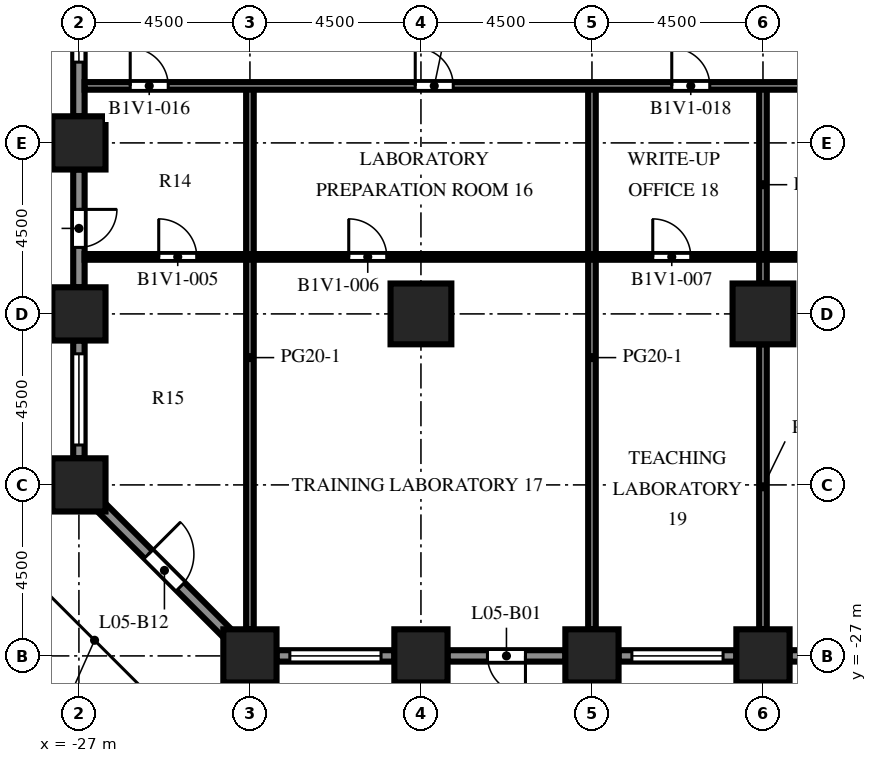
"""IFC4 building model, lengths in metres.
Left out: names, types, materials, properties, quantities, classifications, styles, units other than length and angle.
Written with IfcOpenShell. Run it as: python <this file> out.ifc"""

import sys

from ifc_helpers import new_model, si_unit, direction, frame, frame_2d, origin, origin_2d, place, context, subcontext, project, spatial, rectangle, extrude, element, fill, save


model = new_model("IFC4")
c1 = context("Model", 3, precision=1e-05, world=origin(), true_north=direction((0.0, 1.0)))
c2 = subcontext(c1, "Body", "Model", "MODEL_VIEW")
j1 = project(units=[si_unit("LENGTHUNIT", "METRE"), si_unit("PLANEANGLEUNIT", "RADIAN")], contexts=[c1])
p1 = place(None, origin())
s1 = spatial("IfcSite", under=j1, at=p1, CompositionType="ELEMENT")
p2 = place(p1, origin())
s2 = spatial("IfcBuilding", under=s1, at=p2, CompositionType="ELEMENT")
p3 = place(p2, frame((0.0, 0.0, 23.6)))
s3 = spatial("IfcBuildingStorey", under=s2, at=p3, CompositionType="ELEMENT", Elevation=23.6)
for number, where, z_axis, x_axis in (
    (1, (-27.0, -22.5, 0.0), (0.0, 0.0, 1.0), (1.0, 0.0, 0.0)),
    (2, (-27.0, -18.0, 0.0), (0.0, 0.0, 1.0), (1.0, 0.0, 0.0)),
    (3, (-27.0, -13.5, 0.0), (0.0, 0.0, 1.0), (1.0, 0.0, 0.0)),
    (4, (-22.5, -27.0, 0.0), (0.0, 0.0, 1.0), (1.0, 0.0, 0.0)),
    (5, (-18.0, -27.0, 0.0), (0.0, 0.0, 1.0), (1.0, 0.0, 0.0)),
    (6, (-13.5, -27.0, 0.0), (0.0, 0.0, 1.0), (1.0, 0.0, 0.0)),
    (7, (-9.0, -27.0, 0.0), (0.0, 0.0, 1.0), (1.0, 0.0, 0.0)),
):
    element("IfcColumn", number, at=place(p3, frame(where, z_axis=z_axis, x_axis=x_axis)), inside=s3, PredefinedType="COLUMN", context=c2, shape_type="SweptSolid", body=[
        extrude(rectangle(XDim=1.4, YDim=1.4, at=origin_2d()), origin(), (0.0, 0.0, 1.0), 4.1),
    ])
for number, where, z_axis, x_axis in (
    (8, (-18.0, -18.0, 0.0), (0.0, 0.0, 1.0), (1.0, 0.0, 0.0)),
    (9, (-9.0, -18.0, 0.0), (0.0, 0.0, 1.0), (1.0, 0.0, 0.0)),
):
    element("IfcColumn", number, at=place(p3, frame(where, z_axis=z_axis, x_axis=x_axis)), inside=s3, PredefinedType="COLUMN", context=c2, shape_type="SweptSolid", body=[
        extrude(rectangle(XDim=1.6, YDim=1.6, at=origin_2d()), origin(), (0.0, 0.0, 1.0), 4.1),
    ])
p4 = place(p3, frame((-18.7, -27.0, 0.0), z_axis=(0.0, 0.0, 1.0), x_axis=(-1.0, 0.0, 0.0)))
e10 = element("IfcWall", 10, at=p4, inside=s3, PredefinedType="SOLIDWALL", context=c2, shape_type="SweptSolid", body=[
    extrude(rectangle(XDim=3.1, YDim=0.3, at=frame_2d((1.55, 0.0))), origin(), (0.0, 0.0, 1.0), 2.75),
])
p5 = place(p4, frame((0.35, 0.0, 0.8)))
e11 = element("IfcOpeningElement", 11, at=p5, cuts=e10, PredefinedType="OPENING", context=c2, shape_type="SweptSolid", body=[
    extrude(rectangle(XDim=2.4, YDim=1.7, at=frame_2d((1.2, 0.85))), frame((0.0, 0.16, 0.0), z_axis=(0.0, -1.0, 0.0), x_axis=(1.0, 0.0, 0.0)), (0.0, 0.0, 1.0), 0.32),
])
p6 = place(p3, frame((-14.2, -27.0, 0.0), z_axis=(0.0, 0.0, 1.0), x_axis=(-1.0, 0.0, 0.0)))
e12 = element("IfcWall", 12, at=p6, inside=s3, PredefinedType="SOLIDWALL", context=c2, shape_type="SweptSolid", body=[
    extrude(rectangle(XDim=3.1, YDim=0.3, at=frame_2d((1.55, 0.0))), origin(), (0.0, 0.0, 1.0), 2.75),
])
p7 = place(p6, frame((1.05, 0.0, 0.0)))
e13 = element("IfcOpeningElement", 13, at=p7, cuts=e12, PredefinedType="OPENING", context=c2, shape_type="SweptSolid", body=[
    extrude(rectangle(XDim=1.0, YDim=2.2, at=frame_2d((0.5, 1.1))), frame((0.0, 0.16, 0.0), z_axis=(0.0, -1.0, 0.0), x_axis=(1.0, 0.0, 0.0)), (0.0, 0.0, 1.0), 0.32),
])
p8 = place(p3, frame((-9.7, -27.0, 0.0), z_axis=(0.0, 0.0, 1.0), x_axis=(-1.0, 0.0, 0.0)))
e14 = element("IfcWall", 14, at=p8, inside=s3, PredefinedType="SOLIDWALL", context=c2, shape_type="SweptSolid", body=[
    extrude(rectangle(XDim=3.1, YDim=0.3, at=frame_2d((1.55, 0.0))), origin(), (0.0, 0.0, 1.0), 2.75),
])
p9 = place(p8, frame((0.35, 0.0, 0.8)))
e15 = element("IfcOpeningElement", 15, at=p9, cuts=e14, PredefinedType="OPENING", context=c2, shape_type="SweptSolid", body=[
    extrude(rectangle(XDim=2.4, YDim=1.7, at=frame_2d((1.2, 0.85))), frame((0.0, 0.16, 0.0), z_axis=(0.0, -1.0, 0.0), x_axis=(1.0, 0.0, 0.0)), (0.0, 0.0, 1.0), 0.32),
])
p10 = place(p3, frame((-5.2, -27.0, 0.0), z_axis=(0.0, 0.0, 1.0), x_axis=(-1.0, 0.0, 0.0)))
e16 = element("IfcWall", 16, at=p10, inside=s3, PredefinedType="SOLIDWALL", context=c2, shape_type="SweptSolid", body=[
    extrude(rectangle(XDim=3.1, YDim=0.3, at=frame_2d((1.55, 0.0))), origin(), (0.0, 0.0, 1.0), 2.75),
])
p11 = place(p10, frame((0.35, 0.0, 0.8)))
e17 = element("IfcOpeningElement", 17, at=p11, cuts=e16, PredefinedType="OPENING", context=c2, shape_type="SweptSolid", body=[
    extrude(rectangle(XDim=2.4, YDim=1.7, at=frame_2d((1.2, 0.85))), frame((0.0, 0.16, 0.0), z_axis=(0.0, -1.0, 0.0), x_axis=(1.0, 0.0, 0.0)), (0.0, 0.0, 1.0), 0.32),
])
p12 = place(p3, frame((-27.0, -12.8, 0.0), z_axis=(0.0, 0.0, 1.0), x_axis=(0.0, 1.0, 0.0)))
e18 = element("IfcWall", 18, at=p12, inside=s3, PredefinedType="SOLIDWALL", context=c2, shape_type="SweptSolid", body=[
    extrude(rectangle(XDim=3.1, YDim=0.3, at=frame_2d((1.55, 0.0))), origin(), (0.0, 0.0, 1.0), 2.75),
])
p13 = place(p12, frame((1.425, 0.0, 0.8)))
e19 = element("IfcOpeningElement", 19, at=p13, cuts=e18, PredefinedType="OPENING", context=c2, shape_type="SweptSolid", body=[
    extrude(rectangle(XDim=1.2, YDim=1.7, at=frame_2d((0.6, 0.85))), frame((0.0, 0.16, 0.0), z_axis=(0.0, -1.0, 0.0), x_axis=(1.0, 0.0, 0.0)), (0.0, 0.0, 1.0), 0.32),
])
p14 = place(p3, frame((-27.0, -17.3, 0.0), z_axis=(0.0, 0.0, 1.0), x_axis=(0.0, 1.0, 0.0)))
e20 = element("IfcWall", 20, at=p14, inside=s3, PredefinedType="SOLIDWALL", context=c2, shape_type="SweptSolid", body=[
    extrude(rectangle(XDim=3.1, YDim=0.3, at=frame_2d((1.55, 0.0))), origin(), (0.0, 0.0, 1.0), 2.75),
])
p15 = place(p14, frame((1.05, 0.0, 0.0)))
e21 = element("IfcOpeningElement", 21, at=p15, cuts=e20, PredefinedType="OPENING", context=c2, shape_type="SweptSolid", body=[
    extrude(rectangle(XDim=1.0, YDim=2.2, at=frame_2d((0.5, 1.1))), frame((0.0, 0.16, 0.0), z_axis=(0.0, -1.0, 0.0), x_axis=(1.0, 0.0, 0.0)), (0.0, 0.0, 1.0), 0.32),
])
p16 = place(p3, frame((-27.0, -21.8, 0.0), z_axis=(0.0, 0.0, 1.0), x_axis=(0.0, 1.0, 0.0)))
e22 = element("IfcWall", 22, at=p16, inside=s3, PredefinedType="SOLIDWALL", context=c2, shape_type="SweptSolid", body=[
    extrude(rectangle(XDim=3.1, YDim=0.3, at=frame_2d((1.55, 0.0))), origin(), (0.0, 0.0, 1.0), 2.75),
])
p17 = place(p16, frame((0.35, 0.0, 0.8)))
e23 = element("IfcOpeningElement", 23, at=p17, cuts=e22, PredefinedType="OPENING", context=c2, shape_type="SweptSolid", body=[
    extrude(rectangle(XDim=2.4, YDim=1.7, at=frame_2d((1.2, 0.85))), frame((0.0, 0.16, 0.0), z_axis=(0.0, -1.0, 0.0), x_axis=(1.0, 0.0, 0.0)), (0.0, 0.0, 1.0), 0.32),
])
p18 = place(p3, frame((-23.094, -26.406, 0.0), z_axis=(0.0, 0.0, 1.0), x_axis=(-0.707106781187, 0.707106781187, 0.0)))
e24 = element("IfcWall", 24, at=p18, inside=s3, PredefinedType="SOLIDWALL", context=c2, shape_type="SweptSolid", body=[
    extrude(rectangle(XDim=4.684, YDim=0.3, at=frame_2d((2.342, 0.0))), origin(), (0.0, 0.0, 1.0), 2.75),
])
p19 = place(p18, frame((1.742, 0.0, 0.0)))
e25 = element("IfcOpeningElement", 25, at=p19, cuts=e24, PredefinedType="OPENING", context=c2, shape_type="SweptSolid", body=[
    extrude(rectangle(XDim=1.2, YDim=2.2, at=frame_2d((0.6, 1.1))), frame((0.0, 0.16, 0.0), z_axis=(0.0, -1.0, 0.0), x_axis=(1.0, 0.0, 0.0)), (0.0, 0.0, 1.0), 0.32),
])
for number, where, z_axis, x_axis in (
    (26, (-22.5, -26.3, 0.0), (0.0, 0.0, 1.0), (0.0, 1.0, 0.0)),
    (27, (-13.5, -26.3, 0.0), (0.0, 0.0, 1.0), (0.0, 1.0, 0.0)),
):
    element("IfcWall", number, at=place(p3, frame(where, z_axis=z_axis, x_axis=x_axis)), inside=s3, PredefinedType="PARTITIONING", context=c2, shape_type="SweptSolid", body=[
        extrude(rectangle(XDim=14.3, YDim=0.2, at=frame_2d((7.15, 0.0))), origin(), (0.0, 0.0, 1.0), 3.65),
    ])
p20 = place(p3, frame((-9.0, -26.3, 0.0), z_axis=(0.0, 0.0, 1.0), x_axis=(0.0, 1.0, 0.0)))
e28 = element("IfcWall", 28, at=p20, inside=s3, PredefinedType="PARTITIONING", context=c2, shape_type="SweptSolid", body=[
    extrude(rectangle(XDim=7.5, YDim=0.2, at=frame_2d((3.75, 0.0))), origin(), (0.0, 0.0, 1.0), 3.65),
])
p21 = place(p3, frame((-9.0, -17.2, 0.0), z_axis=(0.0, 0.0, 1.0), x_axis=(0.0, 1.0, 0.0)))
e29 = element("IfcWall", 29, at=p21, inside=s3, PredefinedType="PARTITIONING", context=c2, shape_type="SweptSolid", body=[
    extrude(rectangle(XDim=5.2, YDim=0.2, at=frame_2d((2.6, 0.0))), origin(), (0.0, 0.0, 1.0), 3.65),
])
p22 = place(p3, frame((26.85, -16.5, 0.0), z_axis=(0.0, 0.0, 1.0), x_axis=(-1.0, 0.0, 0.0)))
e30 = element("IfcWall", 30, at=p22, inside=s3, PredefinedType="PARTITIONING", context=c2, shape_type="SweptSolid", body=[
    extrude(rectangle(XDim=53.7, YDim=0.15, at=frame_2d((26.85, 0.0))), origin(), (0.0, 0.0, 1.0), 3.65),
])
p23 = place(p22, frame((50.75, 0.0, 0.0)))
e31 = element("IfcOpeningElement", 31, at=p23, cuts=e30, PredefinedType="OPENING", context=c2, shape_type="SweptSolid", body=[
    extrude(rectangle(XDim=1.0, YDim=2.1, at=frame_2d((0.5, 1.05))), frame((0.0, 0.085, 0.0), z_axis=(0.0, -1.0, 0.0), x_axis=(1.0, 0.0, 0.0)), (0.0, 0.0, 1.0), 0.17),
])
p24 = place(p22, frame((45.75, 0.0, 0.0)))
e32 = element("IfcOpeningElement", 32, at=p24, cuts=e30, PredefinedType="OPENING", context=c2, shape_type="SweptSolid", body=[
    extrude(rectangle(XDim=1.0, YDim=2.1, at=frame_2d((0.5, 1.05))), frame((0.0, 0.085, 0.0), z_axis=(0.0, -1.0, 0.0), x_axis=(1.0, 0.0, 0.0)), (0.0, 0.0, 1.0), 0.17),
])
p25 = place(p22, frame((37.75, 0.0, 0.0)))
e33 = element("IfcOpeningElement", 33, at=p25, cuts=e30, PredefinedType="OPENING", context=c2, shape_type="SweptSolid", body=[
    extrude(rectangle(XDim=1.0, YDim=2.1, at=frame_2d((0.5, 1.05))), frame((0.0, 0.085, 0.0), z_axis=(0.0, -1.0, 0.0), x_axis=(1.0, 0.0, 0.0)), (0.0, 0.0, 1.0), 0.17),
])
p26 = place(p22, frame((28.25, 0.0, 0.0)))
e34 = element("IfcOpeningElement", 34, at=p26, cuts=e30, PredefinedType="OPENING", context=c2, shape_type="SweptSolid", body=[
    extrude(rectangle(XDim=1.0, YDim=2.1, at=frame_2d((0.5, 1.05))), frame((0.0, 0.085, 0.0), z_axis=(0.0, -1.0, 0.0), x_axis=(1.0, 0.0, 0.0)), (0.0, 0.0, 1.0), 0.17),
])
p27 = place(p22, frame((19.75, 0.0, 0.0)))
e35 = element("IfcOpeningElement", 35, at=p27, cuts=e30, PredefinedType="OPENING", context=c2, shape_type="SweptSolid", body=[
    extrude(rectangle(XDim=1.0, YDim=2.1, at=frame_2d((0.5, 1.05))), frame((0.0, 0.085, 0.0), z_axis=(0.0, -1.0, 0.0), x_axis=(1.0, 0.0, 0.0)), (0.0, 0.0, 1.0), 0.17),
])
p28 = place(p22, frame((13.5, 0.0, 0.0)))
e36 = element("IfcOpeningElement", 36, at=p28, cuts=e30, PredefinedType="OPENING", context=c2, shape_type="SweptSolid", body=[
    extrude(rectangle(XDim=1.0, YDim=2.1, at=frame_2d((0.5, 1.05))), frame((0.0, 0.085, 0.0), z_axis=(0.0, -1.0, 0.0), x_axis=(1.0, 0.0, 0.0)), (0.0, 0.0, 1.0), 0.17),
])
p29 = place(p22, frame((6.75, 0.0, 0.0)))
e37 = element("IfcOpeningElement", 37, at=p29, cuts=e30, PredefinedType="OPENING", context=c2, shape_type="SweptSolid", body=[
    extrude(rectangle(XDim=1.0, YDim=2.1, at=frame_2d((0.5, 1.05))), frame((0.0, 0.085, 0.0), z_axis=(0.0, -1.0, 0.0), x_axis=(1.0, 0.0, 0.0)), (0.0, 0.0, 1.0), 0.17),
])
p30 = place(p22, frame((1.25, 0.0, 0.0)))
e38 = element("IfcOpeningElement", 38, at=p30, cuts=e30, PredefinedType="OPENING", context=c2, shape_type="SweptSolid", body=[
    extrude(rectangle(XDim=1.0, YDim=2.1, at=frame_2d((0.5, 1.05))), frame((0.0, 0.085, 0.0), z_axis=(0.0, -1.0, 0.0), x_axis=(1.0, 0.0, 0.0)), (0.0, 0.0, 1.0), 0.17),
])
p31 = place(p3, frame((26.85, -12.0, 0.0), z_axis=(0.0, 0.0, 1.0), x_axis=(-1.0, 0.0, 0.0)))
e39 = element("IfcWall", 39, at=p31, inside=s3, PredefinedType="PARTITIONING", context=c2, shape_type="SweptSolid", body=[
    extrude(rectangle(XDim=53.7, YDim=0.2, at=frame_2d((26.85, 0.0))), origin(), (0.0, 0.0, 1.0), 3.65),
])
p32 = place(p31, frame((51.5, 0.0, 0.0)))
e40 = element("IfcOpeningElement", 40, at=p32, cuts=e39, PredefinedType="OPENING", context=c2, shape_type="SweptSolid", body=[
    extrude(rectangle(XDim=1.0, YDim=2.1, at=frame_2d((0.5, 1.05))), frame((0.0, 0.11, 0.0), z_axis=(0.0, -1.0, 0.0), x_axis=(1.0, 0.0, 0.0)), (0.0, 0.0, 1.0), 0.22),
])
p33 = place(p31, frame((44.0, 0.0, 0.0)))
e41 = element("IfcOpeningElement", 41, at=p33, cuts=e39, PredefinedType="OPENING", context=c2, shape_type="SweptSolid", body=[
    extrude(rectangle(XDim=1.0, YDim=2.1, at=frame_2d((0.5, 1.05))), frame((0.0, 0.11, 0.0), z_axis=(0.0, -1.0, 0.0), x_axis=(1.0, 0.0, 0.0)), (0.0, 0.0, 1.0), 0.22),
])
p34 = place(p31, frame((37.25, 0.0, 0.0)))
e42 = element("IfcOpeningElement", 42, at=p34, cuts=e39, PredefinedType="OPENING", context=c2, shape_type="SweptSolid", body=[
    extrude(rectangle(XDim=1.0, YDim=2.1, at=frame_2d((0.5, 1.05))), frame((0.0, 0.11, 0.0), z_axis=(0.0, -1.0, 0.0), x_axis=(1.0, 0.0, 0.0)), (0.0, 0.0, 1.0), 0.22),
])
p35 = place(p31, frame((30.5, 0.0, 0.0)))
e43 = element("IfcOpeningElement", 43, at=p35, cuts=e39, PredefinedType="OPENING", context=c2, shape_type="SweptSolid", body=[
    extrude(rectangle(XDim=1.0, YDim=2.1, at=frame_2d((0.5, 1.05))), frame((0.0, 0.11, 0.0), z_axis=(0.0, -1.0, 0.0), x_axis=(1.0, 0.0, 0.0)), (0.0, 0.0, 1.0), 0.22),
])
p36 = place(p31, frame((20.0, 0.0, 0.0)))
e44 = element("IfcOpeningElement", 44, at=p36, cuts=e39, PredefinedType="OPENING", context=c2, shape_type="SweptSolid", body=[
    extrude(rectangle(XDim=1.0, YDim=2.1, at=frame_2d((0.5, 1.05))), frame((0.0, 0.11, 0.0), z_axis=(0.0, -1.0, 0.0), x_axis=(1.0, 0.0, 0.0)), (0.0, 0.0, 1.0), 0.22),
])
p37 = place(p31, frame((13.0, 0.0, 0.0)))
e45 = element("IfcOpeningElement", 45, at=p37, cuts=e39, PredefinedType="OPENING", context=c2, shape_type="SweptSolid", body=[
    extrude(rectangle(XDim=1.0, YDim=2.1, at=frame_2d((0.5, 1.05))), frame((0.0, 0.11, 0.0), z_axis=(0.0, -1.0, 0.0), x_axis=(1.0, 0.0, 0.0)), (0.0, 0.0, 1.0), 0.22),
])
p38 = place(p31, frame((5.75, 0.0, 0.0)))
e46 = element("IfcOpeningElement", 46, at=p38, cuts=e39, PredefinedType="OPENING", context=c2, shape_type="SweptSolid", body=[
    extrude(rectangle(XDim=1.0, YDim=2.1, at=frame_2d((0.5, 1.05))), frame((0.0, 0.11, 0.0), z_axis=(0.0, -1.0, 0.0), x_axis=(1.0, 0.0, 0.0)), (0.0, 0.0, 1.0), 0.22),
])
p39 = place(p31, frame((1.25, 0.0, 0.0)))
e47 = element("IfcOpeningElement", 47, at=p39, cuts=e39, PredefinedType="OPENING", context=c2, shape_type="SweptSolid", body=[
    extrude(rectangle(XDim=1.0, YDim=2.1, at=frame_2d((0.5, 1.05))), frame((0.0, 0.11, 0.0), z_axis=(0.0, -1.0, 0.0), x_axis=(1.0, 0.0, 0.0)), (0.0, 0.0, 1.0), 0.22),
])
p40 = place(p5, origin())
e48 = element("IfcWindow", 48, at=p40, inside=s3, PartitioningType="SINGLE_PANEL", PredefinedType="WINDOW", context=c2, shape_type="SweptSolid", body=[
    extrude(rectangle(XDim=2.4, YDim=1.7, at=frame_2d((1.2, 0.85))), frame((0.0, 0.03, 0.0), z_axis=(0.0, -1.0, 0.0), x_axis=(1.0, 0.0, 0.0)), (0.0, 0.0, 1.0), 0.06),
])
fill(e11, e48)
p41 = place(p7, origin())
e49 = element("IfcDoor", 49, at=p41, inside=s3, OperationType="SINGLE_SWING_LEFT", PredefinedType="DOOR", context=c2, shape_type="SweptSolid", body=[
    extrude(rectangle(XDim=1.0, YDim=2.2, at=frame_2d((0.5, 1.1))), frame((0.0, 0.025, 0.0), z_axis=(0.0, -1.0, 0.0), x_axis=(1.0, 0.0, 0.0)), (0.0, 0.0, 1.0), 0.05),
])
fill(e13, e49)
p42 = place(p9, origin())
e50 = element("IfcWindow", 50, at=p42, inside=s3, PartitioningType="SINGLE_PANEL", PredefinedType="WINDOW", context=c2, shape_type="SweptSolid", body=[
    extrude(rectangle(XDim=2.4, YDim=1.7, at=frame_2d((1.2, 0.85))), frame((0.0, 0.03, 0.0), z_axis=(0.0, -1.0, 0.0), x_axis=(1.0, 0.0, 0.0)), (0.0, 0.0, 1.0), 0.06),
])
fill(e15, e50)
p43 = place(p13, origin())
e51 = element("IfcWindow", 51, at=p43, inside=s3, PartitioningType="SINGLE_PANEL", PredefinedType="WINDOW", context=c2, shape_type="SweptSolid", body=[
    extrude(rectangle(XDim=1.2, YDim=1.7, at=frame_2d((0.6, 0.85))), frame((0.0, 0.03, 0.0), z_axis=(0.0, -1.0, 0.0), x_axis=(1.0, 0.0, 0.0)), (0.0, 0.0, 1.0), 0.06),
])
fill(e19, e51)
p44 = place(p15, origin())
e52 = element("IfcDoor", 52, at=p44, inside=s3, OperationType="SINGLE_SWING_RIGHT", PredefinedType="DOOR", context=c2, shape_type="SweptSolid", body=[
    extrude(rectangle(XDim=1.0, YDim=2.2, at=frame_2d((0.5, 1.1))), frame((0.0, 0.025, 0.0), z_axis=(0.0, -1.0, 0.0), x_axis=(1.0, 0.0, 0.0)), (0.0, 0.0, 1.0), 0.05),
])
fill(e21, e52)
p45 = place(p17, origin())
e53 = element("IfcWindow", 53, at=p45, inside=s3, PartitioningType="SINGLE_PANEL", PredefinedType="WINDOW", context=c2, shape_type="SweptSolid", body=[
    extrude(rectangle(XDim=2.4, YDim=1.7, at=frame_2d((1.2, 0.85))), frame((0.0, 0.03, 0.0), z_axis=(0.0, -1.0, 0.0), x_axis=(1.0, 0.0, 0.0)), (0.0, 0.0, 1.0), 0.06),
])
fill(e23, e53)
p46 = place(p19, origin())
e54 = element("IfcDoor", 54, at=p46, inside=s3, OperationType="SINGLE_SWING_RIGHT", PredefinedType="DOOR", context=c2, shape_type="SweptSolid", body=[
    extrude(rectangle(XDim=1.2, YDim=2.2, at=frame_2d((0.6, 1.1))), frame((0.0, 0.025, 0.0), z_axis=(0.0, -1.0, 0.0), x_axis=(1.0, 0.0, 0.0)), (0.0, 0.0, 1.0), 0.05),
])
fill(e25, e54)
p47 = place(p23, origin())
e55 = element("IfcDoor", 55, at=p47, inside=s3, OperationType="SINGLE_SWING_RIGHT", PredefinedType="DOOR", context=c2, shape_type="SweptSolid", body=[
    extrude(rectangle(XDim=1.0, YDim=2.1, at=frame_2d((0.5, 1.05))), frame((0.0, 0.025, 0.0), z_axis=(0.0, -1.0, 0.0), x_axis=(1.0, 0.0, 0.0)), (0.0, 0.0, 1.0), 0.05),
])
fill(e31, e55)
p48 = place(p24, origin())
e56 = element("IfcDoor", 56, at=p48, inside=s3, OperationType="SINGLE_SWING_RIGHT", PredefinedType="DOOR", context=c2, shape_type="SweptSolid", body=[
    extrude(rectangle(XDim=1.0, YDim=2.1, at=frame_2d((0.5, 1.05))), frame((0.0, 0.025, 0.0), z_axis=(0.0, -1.0, 0.0), x_axis=(1.0, 0.0, 0.0)), (0.0, 0.0, 1.0), 0.05),
])
fill(e32, e56)
p49 = place(p25, origin())
e57 = element("IfcDoor", 57, at=p49, inside=s3, OperationType="SINGLE_SWING_RIGHT", PredefinedType="DOOR", context=c2, shape_type="SweptSolid", body=[
    extrude(rectangle(XDim=1.0, YDim=2.1, at=frame_2d((0.5, 1.05))), frame((0.0, 0.025, 0.0), z_axis=(0.0, -1.0, 0.0), x_axis=(1.0, 0.0, 0.0)), (0.0, 0.0, 1.0), 0.05),
])
fill(e33, e57)
p50 = place(p32, origin())
e58 = element("IfcDoor", 58, at=p50, inside=s3, OperationType="SINGLE_SWING_RIGHT", PredefinedType="DOOR", context=c2, shape_type="SweptSolid", body=[
    extrude(rectangle(XDim=1.0, YDim=2.1, at=frame_2d((0.5, 1.05))), frame((0.0, 0.025, 0.0), z_axis=(0.0, -1.0, 0.0), x_axis=(1.0, 0.0, 0.0)), (0.0, 0.0, 1.0), 0.05),
])
fill(e40, e58)
p51 = place(p33, origin())
e59 = element("IfcDoor", 59, at=p51, inside=s3, OperationType="SINGLE_SWING_RIGHT", PredefinedType="DOOR", context=c2, shape_type="SweptSolid", body=[
    extrude(rectangle(XDim=1.0, YDim=2.1, at=frame_2d((0.5, 1.05))), frame((0.0, 0.025, 0.0), z_axis=(0.0, -1.0, 0.0), x_axis=(1.0, 0.0, 0.0)), (0.0, 0.0, 1.0), 0.05),
])
fill(e41, e59)
p52 = place(p34, origin())
e60 = element("IfcDoor", 60, at=p52, inside=s3, OperationType="SINGLE_SWING_RIGHT", PredefinedType="DOOR", context=c2, shape_type="SweptSolid", body=[
    extrude(rectangle(XDim=1.0, YDim=2.1, at=frame_2d((0.5, 1.05))), frame((0.0, 0.025, 0.0), z_axis=(0.0, -1.0, 0.0), x_axis=(1.0, 0.0, 0.0)), (0.0, 0.0, 1.0), 0.05),
])
fill(e42, e60)
save(model, sys.argv[1])
